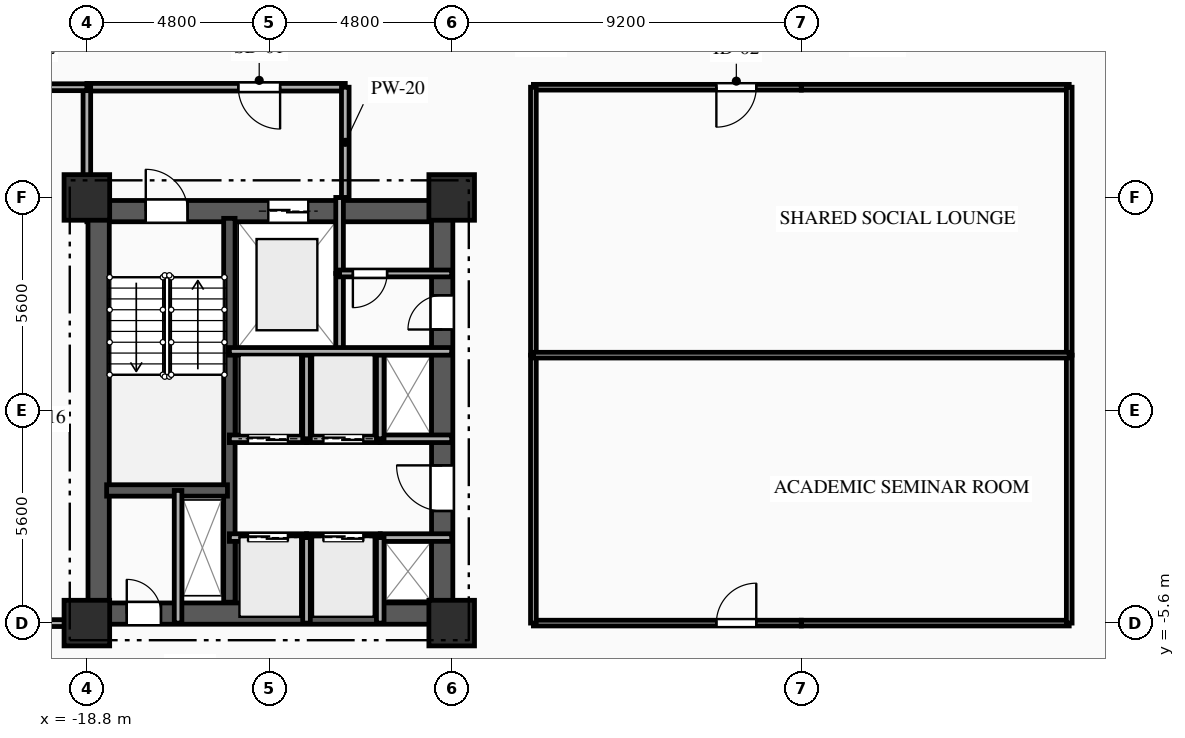
"""IFC4 building model, lengths in metres.
Left out: names, types, materials, properties, quantities, classifications, styles, units other than length and angle.
Written with IfcOpenShell. Run it as: python <this file> out.ifc"""

import sys

from ifc_helpers import new_model, si_unit, direction, frame, frame_2d, origin, origin_2d, place, context, subcontext, project, spatial, rectangle, extrude, element, fill, save


model = new_model("IFC4")
c1 = context("Model", 3, precision=1e-05, world=origin(), true_north=direction((0.0, 1.0)))
c2 = subcontext(c1, "Body", "Model", "MODEL_VIEW")
j1 = project(units=[si_unit("LENGTHUNIT", "METRE"), si_unit("PLANEANGLEUNIT", "RADIAN")], contexts=[c1])
p1 = place(None, origin())
s1 = spatial("IfcSite", under=j1, at=p1, CompositionType="ELEMENT")
p2 = place(p1, origin())
s2 = spatial("IfcBuilding", under=s1, at=p2, CompositionType="ELEMENT")
p3 = place(p2, frame((0.0, 0.0, 40.4)))
s3 = spatial("IfcBuildingStorey", under=s2, at=p3, CompositionType="ELEMENT", Elevation=40.4)
for number, where, z_axis, x_axis in (
    (1, (-18.8, -5.6, 0.0), (0.0, 0.0, 1.0), (1.0, 0.0, 0.0)),
    (2, (-18.8, 5.6, 0.0), (0.0, 0.0, 1.0), (1.0, 0.0, 0.0)),
    (3, (-9.2, -5.6, 0.0), (0.0, 0.0, 1.0), (1.0, 0.0, 0.0)),
    (4, (-9.2, 5.6, 0.0), (0.0, 0.0, 1.0), (1.0, 0.0, 0.0)),
):
    element("IfcColumn", number, at=place(p3, frame(where, z_axis=z_axis, x_axis=x_axis)), inside=s3, PredefinedType="COLUMN", context=c2, shape_type="SweptSolid", body=[
        extrude(rectangle(XDim=1.2, YDim=1.2, at=origin_2d()), origin(), (0.0, 0.0, 1.0), 3.35),
    ])
p4 = place(p3, frame((-18.8, 5.24, 0.0), z_axis=(0.0, 0.0, 1.0), x_axis=(1.0, 0.0, 0.0)))
e5 = element("IfcWall", 5, at=p4, inside=s3, PredefinedType="SHEAR", context=c2, shape_type="SweptSolid", body=[
    extrude(rectangle(XDim=9.6, YDim=0.56, at=frame_2d((4.8, 0.0))), origin(), (0.0, 0.0, 1.0), 3.035),
])
p5 = place(p4, frame((1.55, 0.0, 0.0)))
e6 = element("IfcOpeningElement", 6, at=p5, cuts=e5, PredefinedType="OPENING", context=c2, shape_type="SweptSolid", body=[
    extrude(rectangle(XDim=1.1, YDim=2.15, at=frame_2d((0.55, 1.075))), frame((0.0, 0.29, 0.0), z_axis=(0.0, -1.0, 0.0), x_axis=(1.0, 0.0, 0.0)), (0.0, 0.0, 1.0), 0.58),
])
p6 = place(p4, frame((4.775, 0.0, 0.0)))
e7 = element("IfcOpeningElement", 7, at=p6, cuts=e5, PredefinedType="OPENING", context=c2, shape_type="SweptSolid", body=[
    extrude(rectangle(XDim=1.05, YDim=2.1, at=frame_2d((0.525, 1.05))), frame((0.0, 0.29, 0.0), z_axis=(0.0, -1.0, 0.0), x_axis=(1.0, 0.0, 0.0)), (0.0, 0.0, 1.0), 0.58),
])
p7 = place(p3, frame((-18.8, -5.35, 0.0), z_axis=(0.0, 0.0, 1.0), x_axis=(1.0, 0.0, 0.0)))
e8 = element("IfcWall", 8, at=p7, inside=s3, PredefinedType="SHEAR", context=c2, shape_type="SweptSolid", body=[
    extrude(rectangle(XDim=9.6, YDim=0.56, at=frame_2d((4.8, 0.0))), origin(), (0.0, 0.0, 1.0), 3.035),
])
p8 = place(p7, frame((1.05, 0.0, 0.0)))
e9 = element("IfcOpeningElement", 9, at=p8, cuts=e8, PredefinedType="OPENING", context=c2, shape_type="SweptSolid", body=[
    extrude(rectangle(XDim=0.9, YDim=2.1, at=frame_2d((0.45, 1.05))), frame((0.0, 0.29, 0.0), z_axis=(0.0, -1.0, 0.0), x_axis=(1.0, 0.0, 0.0)), (0.0, 0.0, 1.0), 0.58),
])
p9 = place(p3, frame((-18.49, -5.05, 0.0), z_axis=(0.0, 0.0, 1.0), x_axis=(0.0, 1.0, 0.0)))
e10 = element("IfcWall", 10, at=p9, inside=s3, PredefinedType="SHEAR", context=c2, shape_type="SweptSolid", body=[
    extrude(rectangle(XDim=10.1, YDim=0.56, at=frame_2d((5.05, 0.0))), origin(), (0.0, 0.0, 1.0), 3.035),
])
p10 = place(p3, frame((-9.45, -5.05, 0.0), z_axis=(0.0, 0.0, 1.0), x_axis=(0.0, 1.0, 0.0)))
e11 = element("IfcWall", 11, at=p10, inside=s3, PredefinedType="SHEAR", context=c2, shape_type="SweptSolid", body=[
    extrude(rectangle(XDim=10.1, YDim=0.56, at=frame_2d((5.05, 0.0))), origin(), (0.0, 0.0, 1.0), 3.035),
])
p11 = place(p10, frame((7.175, 0.0, 0.0)))
e12 = element("IfcOpeningElement", 12, at=p11, cuts=e11, PredefinedType="OPENING", context=c2, shape_type="SweptSolid", body=[
    extrude(rectangle(XDim=0.9, YDim=2.1, at=frame_2d((0.45, 1.05))), frame((0.0, 0.29, 0.0), z_axis=(0.0, -1.0, 0.0), x_axis=(1.0, 0.0, 0.0)), (0.0, 0.0, 1.0), 0.58),
])
p12 = place(p10, frame((2.4, 0.0, 0.0)))
e13 = element("IfcOpeningElement", 13, at=p12, cuts=e11, PredefinedType="OPENING", context=c2, shape_type="SweptSolid", body=[
    extrude(rectangle(XDim=1.2, YDim=2.15, at=frame_2d((0.6, 1.075))), frame((0.0, 0.29, 0.0), z_axis=(0.0, -1.0, 0.0), x_axis=(1.0, 0.0, 0.0)), (0.0, 0.0, 1.0), 0.58),
])
p13 = place(p3, frame((-15.05, -5.05, 0.0), z_axis=(0.0, 0.0, 1.0), x_axis=(0.0, 1.0, 0.0)))
e14 = element("IfcWall", 14, at=p13, inside=s3, PredefinedType="SHEAR", context=c2, shape_type="SweptSolid", body=[
    extrude(rectangle(XDim=10.1, YDim=0.3, at=frame_2d((5.05, 0.0))), origin(), (0.0, 0.0, 1.0), 3.035),
])
p14 = place(p3, frame((-18.28, -2.11, 0.0), z_axis=(0.0, 0.0, 1.0), x_axis=(1.0, 0.0, 0.0)))
e15 = element("IfcWall", 15, at=p14, inside=s3, PredefinedType="SHEAR", context=c2, shape_type="SweptSolid", body=[
    extrude(rectangle(XDim=3.18, YDim=0.3, at=frame_2d((1.59, 0.0))), origin(), (0.0, 0.0, 1.0), 3.035),
])
p15 = place(p3, frame((-16.4, -5.6, 0.0), z_axis=(0.0, 0.0, 1.0), x_axis=(0.0, 1.0, 0.0)))
e16 = element("IfcWall", 16, at=p15, inside=s3, PredefinedType="PARTITIONING", context=c2, shape_type="SweptSolid", body=[
    extrude(rectangle(XDim=3.49, YDim=0.2, at=frame_2d((1.745, 0.0))), origin(), (0.0, 0.0, 1.0), 3.035),
])
p16 = place(p3, frame((-12.15, 1.55, 0.0), z_axis=(0.0, 0.0, 1.0), x_axis=(0.0, 1.0, 0.0)))
e17 = element("IfcWall", 17, at=p16, inside=s3, PredefinedType="PARTITIONING", context=c2, shape_type="SweptSolid", body=[
    extrude(rectangle(XDim=2.05, YDim=0.2, at=frame_2d((1.025, 0.0))), origin(), (0.0, 0.0, 1.0), 3.035),
])
p17 = place(p3, frame((-12.15, 3.6, 0.0), z_axis=(0.0, 0.0, 1.0), x_axis=(0.0, 1.0, 0.0)))
e18 = element("IfcWall", 18, at=p17, inside=s3, PredefinedType="PARTITIONING", context=c2, shape_type="SweptSolid", body=[
    extrude(rectangle(XDim=2.0, YDim=0.2, at=frame_2d((1.0, 0.0))), origin(), (0.0, 0.0, 1.0), 3.035),
])
p18 = place(p3, frame((-12.0, 8.5, 0.0), z_axis=(0.0, 0.0, 1.0), x_axis=(-1.0, 0.0, 0.0)))
e19 = element("IfcWall", 19, at=p18, inside=s3, PredefinedType="PARTITIONING", context=c2, shape_type="SweptSolid", body=[
    extrude(rectangle(XDim=6.8, YDim=0.2, at=frame_2d((3.4, 0.0))), origin(), (0.0, 0.0, 1.0), 3.035),
])
p19 = place(p18, frame((1.715, 0.0, 0.0)))
e20 = element("IfcOpeningElement", 20, at=p19, cuts=e19, PredefinedType="OPENING", context=c2, shape_type="SweptSolid", body=[
    extrude(rectangle(XDim=1.1, YDim=2.15, at=frame_2d((0.55, 1.075))), frame((0.0, 0.11, 0.0), z_axis=(0.0, -1.0, 0.0), x_axis=(1.0, 0.0, 0.0)), (0.0, 0.0, 1.0), 0.22),
])
p20 = place(p3, frame((-12.0, 5.6, 0.0), z_axis=(0.0, 0.0, 1.0), x_axis=(0.0, 1.0, 0.0)))
e21 = element("IfcWall", 21, at=p20, inside=s3, PredefinedType="PARTITIONING", context=c2, shape_type="SweptSolid", body=[
    extrude(rectangle(XDim=2.9, YDim=0.2, at=frame_2d((1.45, 0.0))), origin(), (0.0, 0.0, 1.0), 3.035),
])
p21 = place(p3, frame((-18.8, 8.5, 0.0), z_axis=(0.0, 0.0, 1.0), x_axis=(0.0, -1.0, 0.0)))
e22 = element("IfcWall", 22, at=p21, inside=s3, PredefinedType="PARTITIONING", context=c2, shape_type="SweptSolid", body=[
    extrude(rectangle(XDim=2.9, YDim=0.2, at=frame_2d((1.45, 0.0))), origin(), (0.0, 0.0, 1.0), 2.52),
])
p22 = place(p3, frame((-9.2, 3.6, 0.0), z_axis=(0.0, 0.0, 1.0), x_axis=(-1.0, 0.0, 0.0)))
e23 = element("IfcWall", 23, at=p22, inside=s3, PredefinedType="PARTITIONING", context=c2, shape_type="SweptSolid", body=[
    extrude(rectangle(XDim=2.95, YDim=0.18, at=frame_2d((1.475, 0.0))), origin(), (0.0, 0.0, 1.0), 3.035),
])
p23 = place(p22, frame((1.7, 0.0, 0.0)))
e24 = element("IfcOpeningElement", 24, at=p23, cuts=e23, PredefinedType="OPENING", context=c2, shape_type="SweptSolid", body=[
    extrude(rectangle(XDim=0.9, YDim=2.1, at=frame_2d((0.45, 1.05))), frame((0.0, 0.1, 0.0), z_axis=(0.0, -1.0, 0.0), x_axis=(1.0, 0.0, 0.0)), (0.0, 0.0, 1.0), 0.2),
])
p24 = place(p3, frame((-15.05, -3.35, 0.0), z_axis=(0.0, 0.0, 1.0), x_axis=(1.0, 0.0, 0.0)))
e25 = element("IfcWall", 25, at=p24, inside=s3, PredefinedType="PARTITIONING", context=c2, shape_type="SweptSolid", body=[
    extrude(rectangle(XDim=2.03, YDim=0.2, at=frame_2d((1.015, 0.0))), origin(), (0.0, 0.0, 1.0), 3.035),
])
p25 = place(p24, frame((0.49, 0.0, 0.0)))
e26 = element("IfcOpeningElement", 26, at=p25, cuts=e25, PredefinedType="OPENING", context=c2, shape_type="SweptSolid", body=[
    extrude(rectangle(XDim=1.05, YDim=2.1, at=frame_2d((0.525, 1.05))), frame((0.0, 0.11, 0.0), z_axis=(0.0, -1.0, 0.0), x_axis=(1.0, 0.0, 0.0)), (0.0, 0.0, 1.0), 0.22),
])
p26 = place(p3, frame((-13.02, -3.35, 0.0), z_axis=(0.0, 0.0, 1.0), x_axis=(1.0, 0.0, 0.0)))
e27 = element("IfcWall", 27, at=p26, inside=s3, PredefinedType="PARTITIONING", context=c2, shape_type="SweptSolid", body=[
    extrude(rectangle(XDim=1.94, YDim=0.2, at=frame_2d((0.97, 0.0))), origin(), (0.0, 0.0, 1.0), 3.035),
])
p27 = place(p26, frame((0.445, 0.0, 0.0)))
e28 = element("IfcOpeningElement", 28, at=p27, cuts=e27, PredefinedType="OPENING", context=c2, shape_type="SweptSolid", body=[
    extrude(rectangle(XDim=1.05, YDim=2.1, at=frame_2d((0.525, 1.05))), frame((0.0, 0.11, 0.0), z_axis=(0.0, -1.0, 0.0), x_axis=(1.0, 0.0, 0.0)), (0.0, 0.0, 1.0), 0.22),
])
p28 = place(p3, frame((-11.08, -3.35, 0.0), z_axis=(0.0, 0.0, 1.0), x_axis=(1.0, 0.0, 0.0)))
e29 = element("IfcWall", 29, at=p28, inside=s3, PredefinedType="PARTITIONING", context=c2, shape_type="SweptSolid", body=[
    extrude(rectangle(XDim=1.88, YDim=0.2, at=frame_2d((0.94, 0.0))), origin(), (0.0, 0.0, 1.0), 2.75),
])
p29 = place(p3, frame((-13.02, -0.75, 0.0), z_axis=(0.0, 0.0, 1.0), x_axis=(-1.0, 0.0, 0.0)))
e30 = element("IfcWall", 30, at=p29, inside=s3, PredefinedType="PARTITIONING", context=c2, shape_type="SweptSolid", body=[
    extrude(rectangle(XDim=2.03, YDim=0.2, at=frame_2d((1.015, 0.0))), origin(), (0.0, 0.0, 1.0), 3.035),
])
p30 = place(p29, frame((0.49, 0.0, 0.0)))
e31 = element("IfcOpeningElement", 31, at=p30, cuts=e30, PredefinedType="OPENING", context=c2, shape_type="SweptSolid", body=[
    extrude(rectangle(XDim=1.05, YDim=2.1, at=frame_2d((0.525, 1.05))), frame((0.0, 0.11, 0.0), z_axis=(0.0, -1.0, 0.0), x_axis=(1.0, 0.0, 0.0)), (0.0, 0.0, 1.0), 0.22),
])
p31 = place(p3, frame((-11.08, -0.75, 0.0), z_axis=(0.0, 0.0, 1.0), x_axis=(-1.0, 0.0, 0.0)))
e32 = element("IfcWall", 32, at=p31, inside=s3, PredefinedType="PARTITIONING", context=c2, shape_type="SweptSolid", body=[
    extrude(rectangle(XDim=1.94, YDim=0.2, at=frame_2d((0.97, 0.0))), origin(), (0.0, 0.0, 1.0), 3.035),
])
p32 = place(p31, frame((0.445, 0.0, 0.0)))
e33 = element("IfcOpeningElement", 33, at=p32, cuts=e32, PredefinedType="OPENING", context=c2, shape_type="SweptSolid", body=[
    extrude(rectangle(XDim=1.05, YDim=2.1, at=frame_2d((0.525, 1.05))), frame((0.0, 0.11, 0.0), z_axis=(0.0, -1.0, 0.0), x_axis=(1.0, 0.0, 0.0)), (0.0, 0.0, 1.0), 0.22),
])
p33 = place(p3, frame((-9.2, -0.75, 0.0), z_axis=(0.0, 0.0, 1.0), x_axis=(-1.0, 0.0, 0.0)))
e34 = element("IfcWall", 34, at=p33, inside=s3, PredefinedType="PARTITIONING", context=c2, shape_type="SweptSolid", body=[
    extrude(rectangle(XDim=1.88, YDim=0.2, at=frame_2d((0.94, 0.0))), origin(), (0.0, 0.0, 1.0), 3.035),
])
for number, where, z_axis, x_axis in (
    (35, (-13.02, -5.6, 0.0), (0.0, 0.0, 1.0), (0.0, 1.0, 0.0)),
    (36, (-11.08, -5.6, 0.0), (0.0, 0.0, 1.0), (0.0, 1.0, 0.0)),
):
    element("IfcWall", number, at=place(p3, frame(where, z_axis=z_axis, x_axis=x_axis)), inside=s3, PredefinedType="PARTITIONING", context=c2, shape_type="SweptSolid", body=[
        extrude(rectangle(XDim=2.25, YDim=0.2, at=frame_2d((1.125, 0.0))), origin(), (0.0, 0.0, 1.0), 3.035),
    ])
for number, where, z_axis, x_axis in (
    (37, (-13.02, -0.75, 0.0), (0.0, 0.0, 1.0), (0.0, 1.0, 0.0)),
    (38, (-11.08, -0.75, 0.0), (0.0, 0.0, 1.0), (0.0, 1.0, 0.0)),
):
    element("IfcWall", number, at=place(p3, frame(where, z_axis=z_axis, x_axis=x_axis)), inside=s3, PredefinedType="PARTITIONING", context=c2, shape_type="SweptSolid", body=[
        extrude(rectangle(XDim=2.3, YDim=0.2, at=frame_2d((1.15, 0.0))), origin(), (0.0, 0.0, 1.0), 3.035),
    ])
p34 = place(p3, frame((-18.8, 8.5, 0.0), z_axis=(0.0, 0.0, 1.0), x_axis=(-1.0, 0.0, 0.0)))
e39 = element("IfcWall", 39, at=p34, inside=s3, PredefinedType="PARTITIONING", context=c2, shape_type="SweptSolid", body=[
    extrude(rectangle(XDim=2.65, YDim=0.18, at=frame_2d((1.325, 0.0))), origin(), (0.0, 0.0, 1.0), 3.035),
])
p35 = place(p34, frame((1.009, 0.0, 0.0)))
e40 = element("IfcOpeningElement", 40, at=p35, cuts=e39, PredefinedType="OPENING", context=c2, shape_type="SweptSolid", body=[
    extrude(rectangle(XDim=1.0, YDim=2.15, at=frame_2d((0.5, 1.075))), frame((0.0, 0.1, 0.0), z_axis=(0.0, -1.0, 0.0), x_axis=(1.0, 0.0, 0.0)), (0.0, 0.0, 1.0), 0.2),
])
p36 = place(p3, frame((0.0, 8.5, 0.0), z_axis=(0.0, 0.0, 1.0), x_axis=(-1.0, 0.0, 0.0)))
e41 = element("IfcWall", 41, at=p36, inside=s3, PredefinedType="PARTITIONING", context=c2, shape_type="SweptSolid", body=[
    extrude(rectangle(XDim=7.05, YDim=0.15, at=frame_2d((3.525, 0.0))), origin(), (0.0, 0.0, 1.0), 3.035),
])
p37 = place(p36, frame((1.185, 0.0, 0.0)))
e42 = element("IfcOpeningElement", 42, at=p37, cuts=e41, PredefinedType="OPENING", context=c2, shape_type="SweptSolid", body=[
    extrude(rectangle(XDim=1.05, YDim=2.15, at=frame_2d((0.525, 1.075))), frame((0.0, 0.085, 0.0), z_axis=(0.0, -1.0, 0.0), x_axis=(1.0, 0.0, 0.0)), (0.0, 0.0, 1.0), 0.17),
])
p38 = place(p3, frame((7.05, 8.5, 0.0), z_axis=(0.0, 0.0, 1.0), x_axis=(-1.0, 0.0, 0.0)))
e43 = element("IfcWall", 43, at=p38, inside=s3, PredefinedType="PARTITIONING", context=c2, shape_type="SweptSolid", body=[
    extrude(rectangle(XDim=7.05, YDim=0.15, at=frame_2d((3.525, 0.0))), origin(), (0.0, 0.0, 1.0), 3.035),
])
p39 = place(p3, frame((-21.45, -5.6, 0.0), z_axis=(0.0, 0.0, 1.0), x_axis=(1.0, 0.0, 0.0)))
e44 = element("IfcWall", 44, at=p39, inside=s3, PredefinedType="PARTITIONING", context=c2, shape_type="SweptSolid", body=[
    extrude(rectangle(XDim=2.65, YDim=0.18, at=frame_2d((1.325, 0.0))), origin(), (0.0, 0.0, 1.0), 3.035),
])
p40 = place(p3, frame((-7.05, -5.6, 0.0), z_axis=(0.0, 0.0, 1.0), x_axis=(1.0, 0.0, 0.0)))
e45 = element("IfcWall", 45, at=p40, inside=s3, PredefinedType="PARTITIONING", context=c2, shape_type="SweptSolid", body=[
    extrude(rectangle(XDim=7.05, YDim=0.15, at=frame_2d((3.525, 0.0))), origin(), (0.0, 0.0, 1.0), 2.52),
])
p41 = place(p40, frame((4.815, 0.0, 0.0)))
e46 = element("IfcOpeningElement", 46, at=p41, cuts=e45, PredefinedType="OPENING", context=c2, shape_type="SweptSolid", body=[
    extrude(rectangle(XDim=1.05, YDim=2.15, at=frame_2d((0.525, 1.075))), frame((0.0, 0.085, 0.0), z_axis=(0.0, -1.0, 0.0), x_axis=(1.0, 0.0, 0.0)), (0.0, 0.0, 1.0), 0.17),
])
p42 = place(p3, frame((0.0, -5.6, 0.0), z_axis=(0.0, 0.0, 1.0), x_axis=(1.0, 0.0, 0.0)))
e47 = element("IfcWall", 47, at=p42, inside=s3, PredefinedType="PARTITIONING", context=c2, shape_type="SweptSolid", body=[
    extrude(rectangle(XDim=7.05, YDim=0.15, at=frame_2d((3.525, 0.0))), origin(), (0.0, 0.0, 1.0), 2.52),
])
for number, where, z_axis, x_axis in (
    (48, (-7.05, 1.45, 0.0), (0.0, 0.0, 1.0), (0.0, -1.0, 0.0)),
    (49, (-7.05, 8.5, 0.0), (0.0, 0.0, 1.0), (0.0, -1.0, 0.0)),
    (50, (7.05, -5.6, 0.0), (0.0, 0.0, 1.0), (0.0, 1.0, 0.0)),
    (51, (7.05, 1.45, 0.0), (0.0, 0.0, 1.0), (0.0, 1.0, 0.0)),
):
    element("IfcWall", number, at=place(p3, frame(where, z_axis=z_axis, x_axis=x_axis)), inside=s3, PredefinedType="PARTITIONING", context=c2, shape_type="SweptSolid", body=[
        extrude(rectangle(XDim=7.05, YDim=0.15, at=frame_2d((3.525, 0.0))), origin(), (0.0, 0.0, 1.0), 3.035),
    ])
p43 = place(p3, frame((-7.05, 1.45, 0.0), z_axis=(0.0, 0.0, 1.0), x_axis=(1.0, 0.0, 0.0)))
e52 = element("IfcWall", 52, at=p43, inside=s3, PredefinedType="PARTITIONING", context=c2, shape_type="SweptSolid", body=[
    extrude(rectangle(XDim=14.1, YDim=0.15, at=frame_2d((7.05, 0.0))), origin(), (0.0, 0.0, 1.0), 3.035),
])
p44 = place(p3, frame((-15.05, 1.55, 0.0), z_axis=(0.0, 0.0, 1.0), x_axis=(1.0, 0.0, 0.0)))
e53 = element("IfcWall", 53, at=p44, inside=s3, PredefinedType="PARTITIONING", context=c2, shape_type="SweptSolid", body=[
    extrude(rectangle(XDim=5.85, YDim=0.2, at=frame_2d((2.925, 0.0))), origin(), (0.0, 0.0, 1.0), 3.035),
])
p45 = place(p5, origin())
e54 = element("IfcDoor", 54, at=p45, inside=s3, OperationType="SINGLE_SWING_LEFT", PredefinedType="DOOR", context=c2, shape_type="SweptSolid", body=[
    extrude(rectangle(XDim=1.1, YDim=2.15, at=frame_2d((0.55, 1.075))), frame((0.0, 0.025, 0.0), z_axis=(0.0, -1.0, 0.0), x_axis=(1.0, 0.0, 0.0)), (0.0, 0.0, 1.0), 0.05),
])
fill(e6, e54)
p46 = place(p6, origin())
e55 = element("IfcDoor", 55, at=p46, inside=s3, OperationType="DOUBLE_DOOR_SLIDING", PredefinedType="DOOR", context=c2, shape_type="SweptSolid", body=[
    extrude(rectangle(XDim=1.05, YDim=2.1, at=frame_2d((0.525, 1.05))), frame((0.0, 0.025, 0.0), z_axis=(0.0, -1.0, 0.0), x_axis=(1.0, 0.0, 0.0)), (0.0, 0.0, 1.0), 0.05),
])
fill(e7, e55)
p47 = place(p8, origin())
e56 = element("IfcDoor", 56, at=p47, inside=s3, OperationType="SINGLE_SWING_LEFT", PredefinedType="DOOR", context=c2, shape_type="SweptSolid", body=[
    extrude(rectangle(XDim=0.9, YDim=2.1, at=frame_2d((0.45, 1.05))), frame((0.0, 0.025, 0.0), z_axis=(0.0, -1.0, 0.0), x_axis=(1.0, 0.0, 0.0)), (0.0, 0.0, 1.0), 0.05),
])
fill(e9, e56)
p48 = place(p19, origin())
e57 = element("IfcDoor", 57, at=p48, inside=s3, OperationType="SINGLE_SWING_LEFT", PredefinedType="DOOR", context=c2, shape_type="SweptSolid", body=[
    extrude(rectangle(XDim=1.1, YDim=2.15, at=frame_2d((0.55, 1.075))), frame((0.0, 0.025, 0.0), z_axis=(0.0, -1.0, 0.0), x_axis=(1.0, 0.0, 0.0)), (0.0, 0.0, 1.0), 0.05),
])
fill(e20, e57)
p49 = place(p23, origin())
e58 = element("IfcDoor", 58, at=p49, inside=s3, OperationType="SINGLE_SWING_RIGHT", PredefinedType="DOOR", context=c2, shape_type="SweptSolid", body=[
    extrude(rectangle(XDim=0.9, YDim=2.1, at=frame_2d((0.45, 1.05))), frame((0.0, 0.025, 0.0), z_axis=(0.0, -1.0, 0.0), x_axis=(1.0, 0.0, 0.0)), (0.0, 0.0, 1.0), 0.05),
])
fill(e24, e58)
p50 = place(p11, origin())
e59 = element("IfcDoor", 59, at=p50, inside=s3, OperationType="SINGLE_SWING_LEFT", PredefinedType="DOOR", context=c2, shape_type="SweptSolid", body=[
    extrude(rectangle(XDim=0.9, YDim=2.1, at=frame_2d((0.45, 1.05))), frame((0.0, 0.025, 0.0), z_axis=(0.0, -1.0, 0.0), x_axis=(1.0, 0.0, 0.0)), (0.0, 0.0, 1.0), 0.05),
])
fill(e12, e59)
p51 = place(p25, origin())
e60 = element("IfcDoor", 60, at=p51, inside=s3, OperationType="DOUBLE_DOOR_SLIDING", PredefinedType="DOOR", context=c2, shape_type="SweptSolid", body=[
    extrude(rectangle(XDim=1.05, YDim=2.1, at=frame_2d((0.525, 1.05))), frame((0.0, 0.025, 0.0), z_axis=(0.0, -1.0, 0.0), x_axis=(1.0, 0.0, 0.0)), (0.0, 0.0, 1.0), 0.05),
])
fill(e26, e60)
p52 = place(p27, origin())
e61 = element("IfcDoor", 61, at=p52, inside=s3, OperationType="DOUBLE_DOOR_SLIDING", PredefinedType="DOOR", context=c2, shape_type="SweptSolid", body=[
    extrude(rectangle(XDim=1.05, YDim=2.1, at=frame_2d((0.525, 1.05))), frame((0.0, 0.025, 0.0), z_axis=(0.0, -1.0, 0.0), x_axis=(1.0, 0.0, 0.0)), (0.0, 0.0, 1.0), 0.05),
])
fill(e28, e61)
p53 = place(p30, origin())
e62 = element("IfcDoor", 62, at=p53, inside=s3, OperationType="DOUBLE_DOOR_SLIDING", PredefinedType="DOOR", context=c2, shape_type="SweptSolid", body=[
    extrude(rectangle(XDim=1.05, YDim=2.1, at=frame_2d((0.525, 1.05))), frame((0.0, 0.025, 0.0), z_axis=(0.0, -1.0, 0.0), x_axis=(1.0, 0.0, 0.0)), (0.0, 0.0, 1.0), 0.05),
])
fill(e31, e62)
p54 = place(p32, origin())
e63 = element("IfcDoor", 63, at=p54, inside=s3, OperationType="DOUBLE_DOOR_SLIDING", PredefinedType="DOOR", context=c2, shape_type="SweptSolid", body=[
    extrude(rectangle(XDim=1.05, YDim=2.1, at=frame_2d((0.525, 1.05))), frame((0.0, 0.025, 0.0), z_axis=(0.0, -1.0, 0.0), x_axis=(1.0, 0.0, 0.0)), (0.0, 0.0, 1.0), 0.05),
])
fill(e33, e63)
p55 = place(p12, origin())
e64 = element("IfcDoor", 64, at=p55, inside=s3, OperationType="SINGLE_SWING_RIGHT", PredefinedType="DOOR", context=c2, shape_type="SweptSolid", body=[
    extrude(rectangle(XDim=1.2, YDim=2.15, at=frame_2d((0.6, 1.075))), frame((0.0, 0.025, 0.0), z_axis=(0.0, -1.0, 0.0), x_axis=(1.0, 0.0, 0.0)), (0.0, 0.0, 1.0), 0.05),
])
fill(e13, e64)
p56 = place(p37, origin())
e65 = element("IfcDoor", 65, at=p56, inside=s3, OperationType="SINGLE_SWING_RIGHT", PredefinedType="DOOR", context=c2, shape_type="SweptSolid", body=[
    extrude(rectangle(XDim=1.05, YDim=2.15, at=frame_2d((0.525, 1.075))), frame((0.0, 0.025, 0.0), z_axis=(0.0, -1.0, 0.0), x_axis=(1.0, 0.0, 0.0)), (0.0, 0.0, 1.0), 0.05),
])
fill(e42, e65)
p57 = place(p41, origin())
e66 = element("IfcDoor", 66, at=p57, inside=s3, OperationType="SINGLE_SWING_RIGHT", PredefinedType="DOOR", context=c2, shape_type="SweptSolid", body=[
    extrude(rectangle(XDim=1.05, YDim=2.15, at=frame_2d((0.525, 1.075))), frame((0.0, 0.025, 0.0), z_axis=(0.0, -1.0, 0.0), x_axis=(1.0, 0.0, 0.0)), (0.0, 0.0, 1.0), 0.05),
])
fill(e46, e66)
save(model, sys.argv[1])
